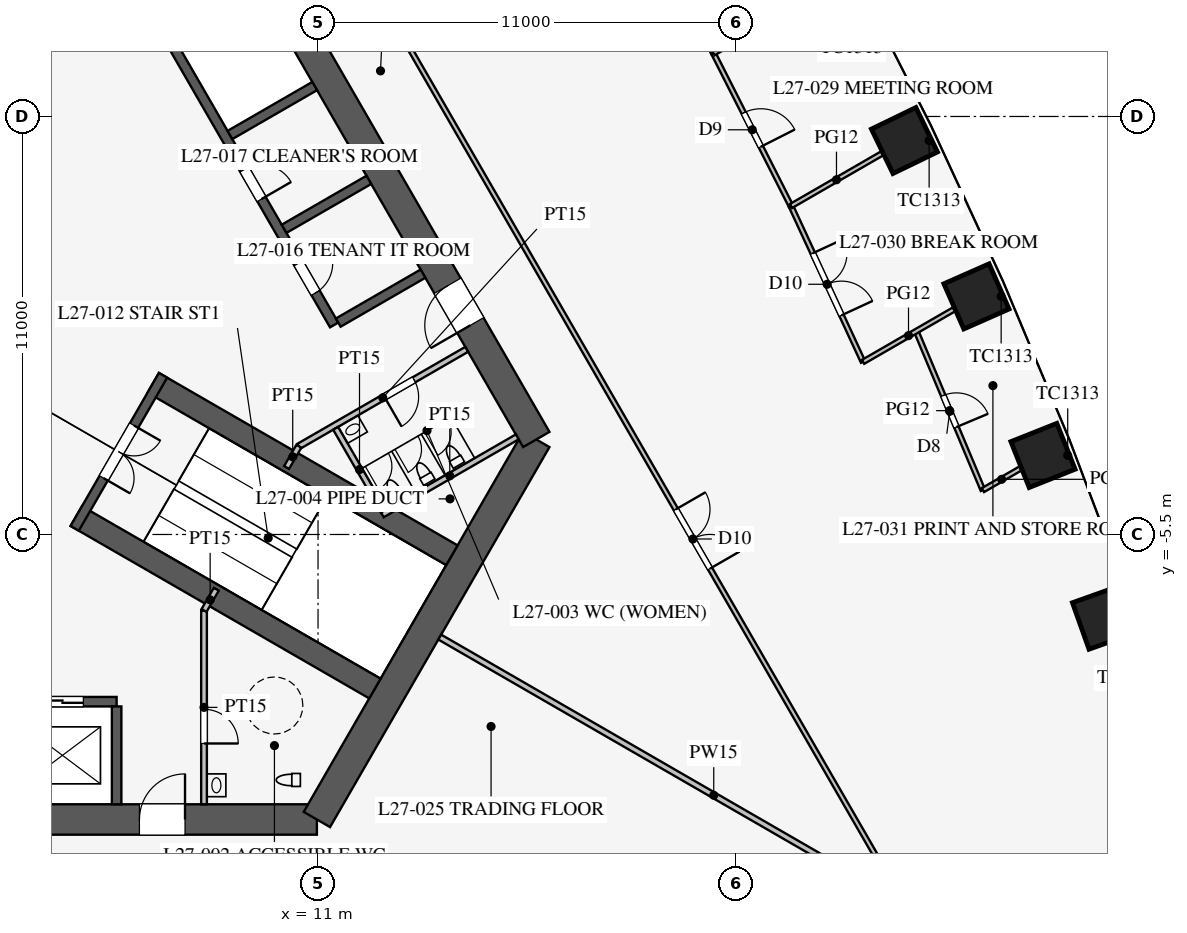
"""IFC4 building model, lengths in metres.
Left out: names, types, materials, properties, quantities, classifications, styles, units other than length and angle.
Written with IfcOpenShell. Run it as: python <this file> out.ifc"""

import sys

from ifc_helpers import new_model, si_unit, direction, frame, frame_2d, origin, origin_2d, place, context, subcontext, project, spatial, rectangle, extrude, element, fill, save


model = new_model("IFC4")
c1 = context("Model", 3, precision=1e-05, world=origin(), true_north=direction((0.0, 1.0)))
c2 = subcontext(c1, "Body", "Model", "MODEL_VIEW")
j1 = project(units=[si_unit("LENGTHUNIT", "METRE"), si_unit("PLANEANGLEUNIT", "RADIAN")], contexts=[c1])
p1 = place(None, origin())
s1 = spatial("IfcSite", under=j1, at=p1, CompositionType="ELEMENT")
p2 = place(p1, origin())
s2 = spatial("IfcBuilding", under=s1, at=p2, CompositionType="ELEMENT")
p3 = place(p2, frame((0.0, 0.0, 119.9)))
s3 = spatial("IfcBuildingStorey", under=s2, at=p3, CompositionType="ELEMENT", Elevation=119.9)
for number, where, z_axis, x_axis in (
    (1, (31.682, -7.689, 0.0), (0.0, 0.0, 1.0), (-0.336, 0.942, 0.0)),
    (2, (30.077, -3.42, 0.0), (0.0, 0.0, 1.0), (-0.37, 0.929, 0.0)),
    (3, (28.325, 0.765, 0.0), (0.0, 0.0, 1.0), (-0.403, 0.915, 0.0)),
    (4, (26.43, 4.867, 0.0), (0.0, 0.0, 1.0), (-0.436, 0.9, 0.0)),
):
    element("IfcColumn", number, at=place(p3, frame(where, z_axis=z_axis, x_axis=x_axis)), inside=s3, PredefinedType="COLUMN", context=c2, shape_type="SweptSolid", body=[
        extrude(rectangle(XDim=1.3, YDim=1.3, at=origin_2d()), origin(), (0.0, 0.0, 1.0), 4.2),
    ])
p4 = place(p3, frame((-10.97, -13.0, 0.0), z_axis=(0.0, 0.0, 1.0), x_axis=(1.0, 0.0, 0.0)))
e5 = element("IfcWall", 5, at=p4, inside=s3, PredefinedType="SHEAR", context=c2, shape_type="SweptSolid", body=[
    extrude(rectangle(XDim=21.939, YDim=0.8, at=frame_2d((10.97, 0.0))), origin(), (0.0, 0.0, 1.0), 4.2),
])
p5 = place(p4, frame((17.27, 0.0, 0.0)))
e6 = element("IfcOpeningElement", 6, at=p5, cuts=e5, PredefinedType="OPENING", context=c2, shape_type="SweptSolid", body=[
    extrude(rectangle(XDim=1.2, YDim=2.1, at=frame_2d((0.6, 1.05))), frame((0.0, 0.41, 0.0), z_axis=(0.0, -1.0, 0.0), x_axis=(1.0, 0.0, 0.0)), (0.0, 0.0, 1.0), 0.82),
])
p6 = place(p4, frame((3.47, 0.0, 0.0)))
e7 = element("IfcOpeningElement", 7, at=p6, cuts=e5, PredefinedType="OPENING", context=c2, shape_type="SweptSolid", body=[
    extrude(rectangle(XDim=1.2, YDim=2.1, at=frame_2d((0.6, 1.05))), frame((0.0, 0.41, 0.0), z_axis=(0.0, -1.0, 0.0), x_axis=(1.0, 0.0, 0.0)), (0.0, 0.0, 1.0), 0.82),
])
p7 = place(p3, frame((10.97, -13.0, 0.0), z_axis=(0.0, 0.0, 1.0), x_axis=(0.499995765644, 0.866027848477, 0.0)))
e8 = element("IfcWall", 8, at=p7, inside=s3, PredefinedType="SHEAR", context=c2, shape_type="SweptSolid", body=[
    extrude(rectangle(XDim=11.547, YDim=0.8, at=frame_2d((5.773, 0.0))), origin(), (0.0, 0.0, 1.0), 4.2),
])
p8 = place(p3, frame((16.743, -3.0, 0.0), z_axis=(0.0, 0.0, 1.0), x_axis=(-0.500002442456, 0.866023993627, 0.0)))
e9 = element("IfcWall", 9, at=p8, inside=s3, PredefinedType="SHEAR", context=c2, shape_type="SweptSolid", body=[
    extrude(rectangle(XDim=21.939, YDim=0.8, at=frame_2d((10.97, 0.0))), origin(), (0.0, 0.0, 1.0), 4.2),
])
p9 = place(p8, frame((17.27, 0.0, 0.0)))
e10 = element("IfcOpeningElement", 10, at=p9, cuts=e9, PredefinedType="OPENING", context=c2, shape_type="SweptSolid", body=[
    extrude(rectangle(XDim=1.2, YDim=2.1, at=frame_2d((0.6, 1.05))), frame((0.0, 0.41, 0.0), z_axis=(0.0, -1.0, 0.0), x_axis=(1.0, 0.0, 0.0)), (0.0, 0.0, 1.0), 0.82),
])
p10 = place(p8, frame((3.47, 0.0, 0.0)))
e11 = element("IfcOpeningElement", 11, at=p10, cuts=e9, PredefinedType="OPENING", context=c2, shape_type="SweptSolid", body=[
    extrude(rectangle(XDim=1.2, YDim=2.1, at=frame_2d((0.6, 1.05))), frame((0.0, 0.41, 0.0), z_axis=(0.0, -1.0, 0.0), x_axis=(1.0, 0.0, 0.0)), (0.0, 0.0, 1.0), 0.82),
])
p11 = place(p3, frame((-5.7, -9.9, 0.0), z_axis=(0.0, 0.0, 1.0), x_axis=(1.0, 0.0, 0.0)))
e12 = element("IfcWall", 12, at=p11, inside=s3, PredefinedType="SHEAR", context=c2, shape_type="SweptSolid", body=[
    extrude(rectangle(XDim=11.4, YDim=0.25, at=frame_2d((5.7, 0.0))), origin(), (0.0, 0.0, 1.0), 4.2),
])
p12 = place(p11, frame((0.875, 0.0, 0.0)))
e13 = element("IfcOpeningElement", 13, at=p12, cuts=e12, PredefinedType="OPENING", context=c2, shape_type="SweptSolid", body=[
    extrude(rectangle(XDim=1.1, YDim=2.2, at=frame_2d((0.55, 1.1))), frame((0.0, 0.135, 0.0), z_axis=(0.0, -1.0, 0.0), x_axis=(1.0, 0.0, 0.0)), (0.0, 0.0, 1.0), 0.27),
])
p13 = place(p11, frame((3.725, 0.0, 0.0)))
e14 = element("IfcOpeningElement", 14, at=p13, cuts=e12, PredefinedType="OPENING", context=c2, shape_type="SweptSolid", body=[
    extrude(rectangle(XDim=1.1, YDim=2.2, at=frame_2d((0.55, 1.1))), frame((0.0, 0.135, 0.0), z_axis=(0.0, -1.0, 0.0), x_axis=(1.0, 0.0, 0.0)), (0.0, 0.0, 1.0), 0.27),
])
p14 = place(p11, frame((6.575, 0.0, 0.0)))
e15 = element("IfcOpeningElement", 15, at=p14, cuts=e12, PredefinedType="OPENING", context=c2, shape_type="SweptSolid", body=[
    extrude(rectangle(XDim=1.1, YDim=2.2, at=frame_2d((0.55, 1.1))), frame((0.0, 0.135, 0.0), z_axis=(0.0, -1.0, 0.0), x_axis=(1.0, 0.0, 0.0)), (0.0, 0.0, 1.0), 0.27),
])
p15 = place(p11, frame((9.425, 0.0, 0.0)))
e16 = element("IfcOpeningElement", 16, at=p15, cuts=e12, PredefinedType="OPENING", context=c2, shape_type="SweptSolid", body=[
    extrude(rectangle(XDim=1.1, YDim=2.2, at=frame_2d((0.55, 1.1))), frame((0.0, 0.135, 0.0), z_axis=(0.0, -1.0, 0.0), x_axis=(1.0, 0.0, 0.0)), (0.0, 0.0, 1.0), 0.27),
])
p16 = place(p3, frame((5.7, -10.025, 0.0), z_axis=(0.0, 0.0, 1.0), x_axis=(0.0, -1.0, 0.0)))
e17 = element("IfcWall", 17, at=p16, inside=s3, PredefinedType="SHEAR", context=c2, shape_type="SweptSolid", body=[
    extrude(rectangle(XDim=2.575, YDim=0.25, at=frame_2d((1.288, 0.0))), origin(), (0.0, 0.0, 1.0), 4.2),
])
p17 = place(p3, frame((11.424, 0.014, 0.0), z_axis=(0.0, 0.0, 1.0), x_axis=(-0.500001763848, 0.866024385424, 0.0)))
e18 = element("IfcWall", 18, at=p17, inside=s3, PredefinedType="SHEAR", context=c2, shape_type="SweptSolid", body=[
    extrude(rectangle(XDim=11.4, YDim=0.25, at=frame_2d((5.7, 0.0))), origin(), (0.0, 0.0, 1.0), 4.2),
])
p18 = place(p17, frame((0.975, 0.0, 0.0)))
e19 = element("IfcOpeningElement", 19, at=p18, cuts=e18, PredefinedType="OPENING", context=c2, shape_type="SweptSolid", body=[
    extrude(rectangle(XDim=0.9, YDim=2.1, at=frame_2d((0.45, 1.05))), frame((0.0, 0.135, 0.0), z_axis=(0.0, -1.0, 0.0), x_axis=(1.0, 0.0, 0.0)), (0.0, 0.0, 1.0), 0.27),
])
p19 = place(p17, frame((3.825, 0.0, 0.0)))
e20 = element("IfcOpeningElement", 20, at=p19, cuts=e18, PredefinedType="OPENING", context=c2, shape_type="SweptSolid", body=[
    extrude(rectangle(XDim=0.9, YDim=2.1, at=frame_2d((0.45, 1.05))), frame((0.0, 0.135, 0.0), z_axis=(0.0, -1.0, 0.0), x_axis=(1.0, 0.0, 0.0)), (0.0, 0.0, 1.0), 0.27),
])
for number, where, z_axis, x_axis in (
    (21, (11.532, 0.076, 0.0), (0.0, 0.0, 1.0), (0.866, 0.5, 0.0)),
    (22, (10.107, 2.544, 0.0), (0.0, 0.0, 1.0), (0.866, 0.5, 0.0)),
    (23, (8.682, 5.012, 0.0), (0.0, 0.0, 1.0), (0.866, 0.5, 0.0)),
):
    element("IfcWall", number, at=place(p3, frame(where, z_axis=z_axis, x_axis=x_axis)), inside=s3, PredefinedType="SHEAR", context=c2, shape_type="SweptSolid", body=[
        extrude(rectangle(XDim=2.575, YDim=0.25, at=frame_2d((1.288, 0.0))), origin(), (0.0, 0.0, 1.0), 4.2),
    ])
for number, where, z_axis, x_axis in (
    (24, (4.638, -5.016, 0.0), (0.0, 0.0, 1.0), (0.866, -0.5, 0.0)),
    (25, (6.663, -1.509, 0.0), (0.0, 0.0, 1.0), (0.866, -0.5, 0.0)),
):
    element("IfcWall", number, at=place(p3, frame(where, z_axis=z_axis, x_axis=x_axis)), inside=s3, PredefinedType="SHEAR", context=c2, shape_type="SweptSolid", body=[
        extrude(rectangle(XDim=9.075, YDim=0.6, at=frame_2d((4.538, 0.0))), origin(), (0.0, 0.0, 1.0), 4.2),
    ])
p20 = place(p3, frame((4.597, -5.339, 0.0), z_axis=(0.0, 0.0, 1.0), x_axis=(0.499984536904, 0.866034331223, 0.0)))
e26 = element("IfcWall", 26, at=p20, inside=s3, PredefinedType="SHEAR", context=c2, shape_type="SweptSolid", body=[
    extrude(rectangle(XDim=4.65, YDim=0.25, at=frame_2d((2.325, 0.0))), origin(), (0.0, 0.0, 1.0), 4.2),
])
p21 = place(p20, frame((1.525, 0.0, 0.0)))
e27 = element("IfcOpeningElement", 27, at=p21, cuts=e26, PredefinedType="OPENING", context=c2, shape_type="SweptSolid", body=[
    extrude(rectangle(XDim=1.6, YDim=2.1, at=frame_2d((0.8, 1.05))), frame((0.0, 0.135, 0.0), z_axis=(0.0, -1.0, 0.0), x_axis=(1.0, 0.0, 0.0)), (0.0, 0.0, 1.0), 0.27),
])
p22 = place(p3, frame((8.0, -7.5, 0.0), z_axis=(0.0, 0.0, 1.0), x_axis=(0.0, -1.0, 0.0)))
e28 = element("IfcWall", 28, at=p22, inside=s3, PredefinedType="PARTITIONING", context=c2, shape_type="SweptSolid", body=[
    extrude(rectangle(XDim=5.1, YDim=0.15, at=frame_2d((2.55, 0.0))), origin(), (0.0, 0.0, 1.0), 4.0),
])
p23 = place(p22, frame((2.6, 0.0, 0.0)))
e29 = element("IfcOpeningElement", 29, at=p23, cuts=e28, PredefinedType="OPENING", context=c2, shape_type="SweptSolid", body=[
    extrude(rectangle(XDim=0.9, YDim=2.1, at=frame_2d((0.45, 1.05))), frame((0.0, 0.085, 0.0), z_axis=(0.0, -1.0, 0.0), x_axis=(1.0, 0.0, 0.0)), (0.0, 0.0, 1.0), 0.17),
])
p24 = place(p3, frame((10.495, -3.178, 0.0), z_axis=(0.0, 0.0, 1.0), x_axis=(0.86602216432, 0.500005610874, 0.0)))
e30 = element("IfcWall", 30, at=p24, inside=s3, PredefinedType="PARTITIONING", context=c2, shape_type="SweptSolid", body=[
    extrude(rectangle(XDim=5.1, YDim=0.15, at=frame_2d((2.55, 0.0))), origin(), (0.0, 0.0, 1.0), 4.0),
])
p25 = place(p24, frame((2.6, 0.0, 0.0)))
e31 = element("IfcOpeningElement", 31, at=p25, cuts=e30, PredefinedType="OPENING", context=c2, shape_type="SweptSolid", body=[
    extrude(rectangle(XDim=0.9, YDim=2.1, at=frame_2d((0.45, 1.05))), frame((0.0, 0.085, 0.0), z_axis=(0.0, -1.0, 0.0), x_axis=(1.0, 0.0, 0.0)), (0.0, 0.0, 1.0), 0.17),
])
for number, where, z_axis, x_axis in (
    (32, (8.0, -7.5, 0.0), (0.0, 0.0, 1.0), (0.5, 0.866, 0.0)),
    (33, (10.495, -3.178, 0.0), (0.0, 0.0, 1.0), (-0.5, -0.866, 0.0)),
):
    element("IfcWall", number, at=place(p3, frame(where, z_axis=z_axis, x_axis=x_axis)), inside=s3, PredefinedType="PARTITIONING", context=c2, shape_type="SweptSolid", body=[
        extrude(rectangle(XDim=0.645, YDim=0.15, at=frame_2d((0.323, 0.0))), origin(), (0.0, 0.0, 1.0), 4.0),
    ])
p26 = place(p3, frame((12.691, -4.982, 0.0), z_axis=(0.0, 0.0, 1.0), x_axis=(0.8660249478, 0.500000789788, 0.0)))
e34 = element("IfcWall", 34, at=p26, inside=s3, PredefinedType="PARTITIONING", context=c2, shape_type="SweptSolid", body=[
    extrude(rectangle(XDim=4.1, YDim=0.15, at=frame_2d((2.05, 0.0))), origin(), (0.0, 0.0, 1.0), 4.0),
])
p27 = place(p3, frame((11.464, -2.706, 0.0), z_axis=(0.0, 0.0, 1.0), x_axis=(0.50001992892, -0.866013897511, 0.0)))
e35 = element("IfcWall", 35, at=p27, inside=s3, PredefinedType="PARTITIONING", context=c2, shape_type="SweptSolid", body=[
    extrude(rectangle(XDim=2.51, YDim=0.15, at=frame_2d((1.255, 0.0))), origin(), (0.0, 0.0, 1.0), 4.0),
])
p28 = place(p3, frame((14.203, -8.2, 0.0), z_axis=(0.0, 0.0, 1.0), x_axis=(0.866024668836, -0.500001272966, 0.0)))
e36 = element("IfcWall", 36, at=p28, inside=s3, PredefinedType="PARTITIONING", context=c2, shape_type="SweptSolid", body=[
    extrude(rectangle(XDim=16.65, YDim=0.15, at=frame_2d((8.325, 0.0))), origin(), (0.0, 0.0, 1.0), 2.3),
])
p29 = place(p3, frame((26.415, -15.231, 0.0), z_axis=(0.0, 0.0, 1.0), x_axis=(-0.50000091641, 0.866024874695, 0.0)))
e37 = element("IfcWall", 37, at=p29, inside=s3, PredefinedType="PARTITIONING", context=c2, shape_type="SweptSolid", body=[
    extrude(rectangle(XDim=52.796, YDim=0.12, at=frame_2d((26.398, 0.0))), origin(), (0.0, 0.0, 1.0), 2.9),
])
p30 = place(p29, frame((10.2, 0.0, 0.15)))
e38 = element("IfcOpeningElement", 38, at=p30, cuts=e37, PredefinedType="OPENING", context=c2, shape_type="SweptSolid", body=[
    extrude(rectangle(XDim=1.8, YDim=2.1, at=frame_2d((0.9, 1.05))), frame((0.0, 0.07, 0.0), z_axis=(0.0, -1.0, 0.0), x_axis=(1.0, 0.0, 0.0)), (0.0, 0.0, 1.0), 0.14),
])
p31 = place(p29, frame((40.8, 0.0, 0.15)))
e39 = element("IfcOpeningElement", 39, at=p31, cuts=e37, PredefinedType="OPENING", context=c2, shape_type="SweptSolid", body=[
    extrude(rectangle(XDim=1.8, YDim=2.1, at=frame_2d((0.9, 1.05))), frame((0.0, 0.07, 0.0), z_axis=(0.0, -1.0, 0.0), x_axis=(1.0, 0.0, 0.0)), (0.0, 0.0, 1.0), 0.14),
])
p32 = place(p3, frame((25.342, -0.958, 0.0), z_axis=(0.0, 0.0, 1.0), x_axis=(-0.419883773418, 0.907577884713, 0.0)))
e40 = element("IfcWall", 40, at=p32, inside=s3, PredefinedType="PARTITIONING", context=c2, shape_type="SweptSolid", body=[
    extrude(rectangle(XDim=4.519, YDim=0.12, at=frame_2d((2.259, 0.0))), origin(), (0.0, 0.0, 1.0), 2.9),
])
p33 = place(p32, frame((1.35, 0.0, 0.15)))
e41 = element("IfcOpeningElement", 41, at=p33, cuts=e40, PredefinedType="OPENING", context=c2, shape_type="SweptSolid", body=[
    extrude(rectangle(XDim=1.8, YDim=2.1, at=frame_2d((0.9, 1.05))), frame((0.0, 0.07, 0.0), z_axis=(0.0, -1.0, 0.0), x_axis=(1.0, 0.0, 0.0)), (0.0, 0.0, 1.0), 0.14),
])
p34 = place(p3, frame((28.495, -4.333, 0.0), z_axis=(0.0, 0.0, 1.0), x_axis=(-0.386742917128, 0.92218757097, 0.0)))
e42 = element("IfcWall", 42, at=p34, inside=s3, PredefinedType="PARTITIONING", context=c2, shape_type="SweptSolid", body=[
    extrude(rectangle(XDim=4.536, YDim=0.12, at=frame_2d((2.268, 0.0))), origin(), (0.0, 0.0, 1.0), 2.9),
])
p35 = place(p34, frame((1.8, 0.0, 0.15)))
e43 = element("IfcOpeningElement", 43, at=p35, cuts=e42, PredefinedType="OPENING", context=c2, shape_type="SweptSolid", body=[
    extrude(rectangle(XDim=0.9, YDim=2.1, at=frame_2d((0.45, 1.05))), frame((0.0, 0.07, 0.0), z_axis=(0.0, -1.0, 0.0), x_axis=(1.0, 0.0, 0.0)), (0.0, 0.0, 1.0), 0.14),
])
p36 = place(p3, frame((21.405, 7.162, 0.0), z_axis=(0.0, 0.0, 1.0), x_axis=(-0.484292898211, 0.874905931368, 0.0)))
e44 = element("IfcWall", 44, at=p36, inside=s3, PredefinedType="PARTITIONING", context=c2, shape_type="SweptSolid", body=[
    extrude(rectangle(XDim=4.501, YDim=0.12, at=frame_2d((2.25, 0.0))), origin(), (0.0, 0.0, 1.0), 2.9),
])
p37 = place(p3, frame((23.444, 3.143, 0.0), z_axis=(0.0, 0.0, 1.0), x_axis=(-0.452471679136, 0.891778772779, 0.0)))
e45 = element("IfcWall", 45, at=p37, inside=s3, PredefinedType="PARTITIONING", context=c2, shape_type="SweptSolid", body=[
    extrude(rectangle(XDim=4.507, YDim=0.12, at=frame_2d((2.253, 0.0))), origin(), (0.0, 0.0, 1.0), 2.9),
])
p38 = place(p37, frame((1.75, 0.0, 0.15)))
e46 = element("IfcOpeningElement", 46, at=p38, cuts=e45, PredefinedType="OPENING", context=c2, shape_type="SweptSolid", body=[
    extrude(rectangle(XDim=1.0, YDim=2.1, at=frame_2d((0.5, 1.05))), frame((0.0, 0.07, 0.0), z_axis=(0.0, -1.0, 0.0), x_axis=(1.0, 0.0, 0.0)), (0.0, 0.0, 1.0), 0.14),
])
p39 = place(p3, frame((25.342, -0.958, 0.0), z_axis=(0.0, 0.0, 1.0), x_axis=(0.866014808974, 0.500018350302, 0.0)))
e47 = element("IfcWall", 47, at=p39, inside=s3, PredefinedType="PARTITIONING", context=c2, shape_type="SweptSolid", body=[
    extrude(rectangle(XDim=2.762, YDim=0.12, at=frame_2d((1.381, 0.0))), origin(), (0.0, 0.0, 1.0), 2.9),
])
p40 = place(p3, frame((28.495, -4.333, 0.0), z_axis=(0.0, 0.0, 1.0), x_axis=(0.865992911964, 0.500056273262, 0.0)))
e48 = element("IfcWall", 48, at=p40, inside=s3, PredefinedType="PARTITIONING", context=c2, shape_type="SweptSolid", body=[
    extrude(rectangle(XDim=1.139, YDim=0.12, at=frame_2d((0.57, 0.0))), origin(), (0.0, 0.0, 1.0), 2.9),
])
p41 = place(p3, frame((21.405, 7.162, 0.0), z_axis=(0.0, 0.0, 1.0), x_axis=(0.866015261085, 0.500017567259, 0.0)))
e49 = element("IfcWall", 49, at=p41, inside=s3, PredefinedType="PARTITIONING", context=c2, shape_type="SweptSolid", body=[
    extrude(rectangle(XDim=2.769, YDim=0.12, at=frame_2d((1.385, 0.0))), origin(), (0.0, 0.0, 1.0), 2.9),
])
p42 = place(p3, frame((23.444, 3.143, 0.0), z_axis=(0.0, 0.0, 1.0), x_axis=(0.866023907196, 0.500002592159, 0.0)))
e50 = element("IfcWall", 50, at=p42, inside=s3, PredefinedType="PARTITIONING", context=c2, shape_type="SweptSolid", body=[
    extrude(rectangle(XDim=2.766, YDim=0.12, at=frame_2d((1.383, 0.0))), origin(), (0.0, 0.0, 1.0), 2.9),
])
p43 = place(p23, origin())
e51 = element("IfcDoor", 51, at=p43, inside=s3, OperationType="SINGLE_SWING_RIGHT", PredefinedType="DOOR", context=c2, shape_type="SweptSolid", body=[
    extrude(rectangle(XDim=0.9, YDim=2.1, at=frame_2d((0.45, 1.05))), frame((0.0, 0.025, 0.0), z_axis=(0.0, -1.0, 0.0), x_axis=(1.0, 0.0, 0.0)), (0.0, 0.0, 1.0), 0.05),
])
fill(e29, e51)
p44 = place(p25, frame((0.9, 0.0, 0.0), z_axis=(0.0, 0.0, 1.0), x_axis=(-1.0, 0.0, 0.0)))
e52 = element("IfcDoor", 52, at=p44, inside=s3, OperationType="SINGLE_SWING_RIGHT", PredefinedType="DOOR", context=c2, shape_type="SweptSolid", body=[
    extrude(rectangle(XDim=0.9, YDim=2.1, at=frame_2d((0.45, 1.05))), frame((0.0, 0.025, 0.0), z_axis=(0.0, -1.0, 0.0), x_axis=(1.0, 0.0, 0.0)), (0.0, 0.0, 1.0), 0.05),
])
fill(e31, e52)
p45 = place(p21, frame((1.6, 0.0, 0.0), z_axis=(0.0, 0.0, 1.0), x_axis=(-1.0, 0.0, 0.0)))
e53 = element("IfcDoor", 53, at=p45, inside=s3, OperationType="DOUBLE_DOOR_SINGLE_SWING", PredefinedType="DOOR", context=c2, shape_type="SweptSolid", body=[
    extrude(rectangle(XDim=1.6, YDim=2.1, at=frame_2d((0.8, 1.05))), frame((0.0, 0.025, 0.0), z_axis=(0.0, -1.0, 0.0), x_axis=(1.0, 0.0, 0.0)), (0.0, 0.0, 1.0), 0.05),
])
fill(e27, e53)
p46 = place(p5, origin())
e54 = element("IfcDoor", 54, at=p46, inside=s3, OperationType="SINGLE_SWING_RIGHT", PredefinedType="DOOR", context=c2, shape_type="SweptSolid", body=[
    extrude(rectangle(XDim=1.2, YDim=2.1, at=frame_2d((0.6, 1.05))), frame((0.0, 0.025, 0.0), z_axis=(0.0, -1.0, 0.0), x_axis=(1.0, 0.0, 0.0)), (0.0, 0.0, 1.0), 0.05),
])
fill(e6, e54)
p47 = place(p10, origin())
e55 = element("IfcDoor", 55, at=p47, inside=s3, OperationType="SINGLE_SWING_LEFT", PredefinedType="DOOR", context=c2, shape_type="SweptSolid", body=[
    extrude(rectangle(XDim=1.2, YDim=2.1, at=frame_2d((0.6, 1.05))), frame((0.0, 0.025, 0.0), z_axis=(0.0, -1.0, 0.0), x_axis=(1.0, 0.0, 0.0)), (0.0, 0.0, 1.0), 0.05),
])
fill(e11, e55)
p48 = place(p18, frame((0.9, 0.0, 0.0), z_axis=(0.0, 0.0, 1.0), x_axis=(-1.0, 0.0, 0.0)))
e56 = element("IfcDoor", 56, at=p48, inside=s3, OperationType="SINGLE_SWING_LEFT", PredefinedType="DOOR", context=c2, shape_type="SweptSolid", body=[
    extrude(rectangle(XDim=0.9, YDim=2.1, at=frame_2d((0.45, 1.05))), frame((0.0, 0.025, 0.0), z_axis=(0.0, -1.0, 0.0), x_axis=(1.0, 0.0, 0.0)), (0.0, 0.0, 1.0), 0.05),
])
fill(e19, e56)
p49 = place(p19, frame((0.9, 0.0, 0.0), z_axis=(0.0, 0.0, 1.0), x_axis=(-1.0, 0.0, 0.0)))
e57 = element("IfcDoor", 57, at=p49, inside=s3, OperationType="SINGLE_SWING_RIGHT", PredefinedType="DOOR", context=c2, shape_type="SweptSolid", body=[
    extrude(rectangle(XDim=0.9, YDim=2.1, at=frame_2d((0.45, 1.05))), frame((0.0, 0.025, 0.0), z_axis=(0.0, -1.0, 0.0), x_axis=(1.0, 0.0, 0.0)), (0.0, 0.0, 1.0), 0.05),
])
fill(e20, e57)
p50 = place(p38, frame((1.0, 0.0, 0.0), z_axis=(0.0, 0.0, 1.0), x_axis=(-1.0, 0.0, 0.0)))
e58 = element("IfcDoor", 58, at=p50, inside=s3, OperationType="SINGLE_SWING_RIGHT", PredefinedType="DOOR", context=c2, shape_type="SweptSolid", body=[
    extrude(rectangle(XDim=1.0, YDim=2.1, at=frame_2d((0.5, 1.05))), frame((0.0, 0.025, 0.0), z_axis=(0.0, -1.0, 0.0), x_axis=(1.0, 0.0, 0.0)), (0.0, 0.0, 1.0), 0.05),
])
fill(e46, e58)
p51 = place(p33, frame((1.8, 0.0, 0.0), z_axis=(0.0, 0.0, 1.0), x_axis=(-1.0, 0.0, 0.0)))
e59 = element("IfcDoor", 59, at=p51, inside=s3, OperationType="DOUBLE_DOOR_SINGLE_SWING", PredefinedType="DOOR", context=c2, shape_type="SweptSolid", body=[
    extrude(rectangle(XDim=1.8, YDim=2.1, at=frame_2d((0.9, 1.05))), frame((0.0, 0.025, 0.0), z_axis=(0.0, -1.0, 0.0), x_axis=(1.0, 0.0, 0.0)), (0.0, 0.0, 1.0), 0.05),
])
fill(e41, e59)
p52 = place(p35, frame((0.9, 0.0, 0.0), z_axis=(0.0, 0.0, 1.0), x_axis=(-1.0, 0.0, 0.0)))
e60 = element("IfcDoor", 60, at=p52, inside=s3, OperationType="SINGLE_SWING_RIGHT", PredefinedType="DOOR", context=c2, shape_type="SweptSolid", body=[
    extrude(rectangle(XDim=0.9, YDim=2.1, at=frame_2d((0.45, 1.05))), frame((0.0, 0.025, 0.0), z_axis=(0.0, -1.0, 0.0), x_axis=(1.0, 0.0, 0.0)), (0.0, 0.0, 1.0), 0.05),
])
fill(e43, e60)
p53 = place(p30, frame((1.8, 0.0, 0.0), z_axis=(0.0, 0.0, 1.0), x_axis=(-1.0, 0.0, 0.0)))
e61 = element("IfcDoor", 61, at=p53, inside=s3, OperationType="DOUBLE_DOOR_SINGLE_SWING", PredefinedType="DOOR", context=c2, shape_type="SweptSolid", body=[
    extrude(rectangle(XDim=1.8, YDim=2.1, at=frame_2d((0.9, 1.05))), frame((0.0, 0.025, 0.0), z_axis=(0.0, -1.0, 0.0), x_axis=(1.0, 0.0, 0.0)), (0.0, 0.0, 1.0), 0.05),
])
fill(e38, e61)
p54 = place(p15, origin())
e62 = element("IfcDoor", 62, at=p54, inside=s3, OperationType="DOUBLE_DOOR_SLIDING", PredefinedType="DOOR", context=c2, shape_type="SweptSolid", body=[
    extrude(rectangle(XDim=1.1, YDim=2.2, at=frame_2d((0.55, 1.1))), frame((0.0, 0.025, 0.0), z_axis=(0.0, -1.0, 0.0), x_axis=(1.0, 0.0, 0.0)), (0.0, 0.0, 1.0), 0.05),
])
fill(e16, e62)
save(model, sys.argv[1])
